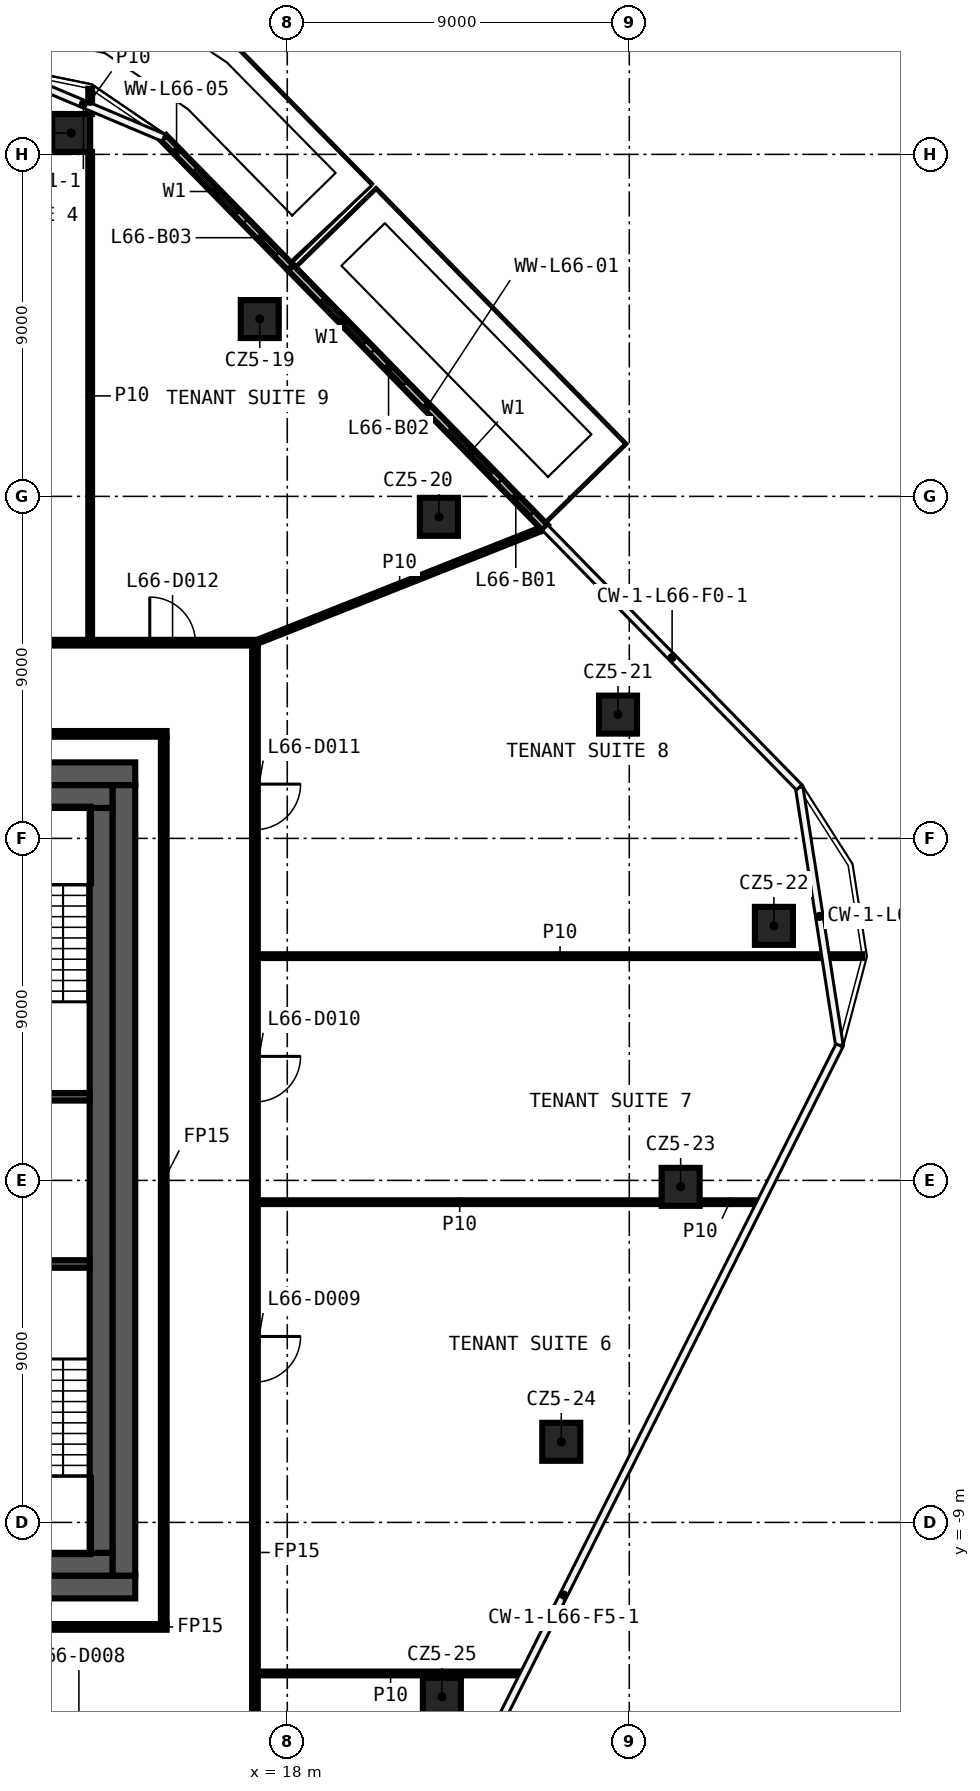
"""IFC4 building model, lengths in metres.
Left out: names, types, materials, properties, quantities, classifications, styles, units other than length and angle.
Written with IfcOpenShell. Run it as: python <this file> out.ifc"""

import sys

from ifc_helpers import new_model, si_unit, direction, frame, frame_2d, origin, origin_2d, place, context, subcontext, project, spatial, rectangle, extrude, element, fill, save


model = new_model("IFC4")
c1 = context("Model", 3, precision=1e-05, world=origin(), true_north=direction((0.0, 1.0)))
c2 = subcontext(c1, "Body", "Model", "MODEL_VIEW")
j1 = project(units=[si_unit("LENGTHUNIT", "METRE"), si_unit("PLANEANGLEUNIT", "RADIAN")], contexts=[c1])
p1 = place(None, origin())
s1 = spatial("IfcSite", under=j1, at=p1, CompositionType="ELEMENT")
p2 = place(p1, origin())
s2 = spatial("IfcBuilding", under=s1, at=p2, CompositionType="ELEMENT")
p3 = place(p2, frame((0.0, 0.0, 311.0)))
s3 = spatial("IfcBuildingStorey", under=s2, at=p3, CompositionType="ELEMENT", Elevation=311.0)
for number, where, z_axis, x_axis in (
    (1, (12.314, 27.563, 0.0), (0.0, 0.0, 1.0), (1.0, 0.0, 0.0)),
    (2, (17.276, 22.666, 0.0), (0.0, 0.0, 1.0), (1.0, 0.0, 0.0)),
    (3, (21.99, 17.462, 0.0), (0.0, 0.0, 1.0), (1.0, 0.0, 0.0)),
    (4, (26.703, 12.257, 0.0), (0.0, 0.0, 1.0), (1.0, 0.0, 0.0)),
    (5, (30.805, 6.698, 0.0), (0.0, 0.0, 1.0), (1.0, 0.0, 0.0)),
    (6, (28.351, -0.17, 0.0), (0.0, 0.0, 1.0), (1.0, 0.0, 0.0)),
    (7, (25.21, -6.879, 0.0), (0.0, 0.0, 1.0), (1.0, 0.0, 0.0)),
    (8, (22.068, -13.588, 0.0), (0.0, 0.0, 1.0), (1.0, 0.0, 0.0)),
):
    element("IfcColumn", number, at=place(p3, frame(where, z_axis=z_axis, x_axis=x_axis)), inside=s3, PredefinedType="COLUMN", context=c2, shape_type="SweptSolid", body=[
        extrude(rectangle(XDim=1.0, YDim=1.0, at=origin_2d()), origin(), (0.0, 0.0, 1.0), 3.82),
    ])
p4 = place(p3, frame((17.225, -12.975, 0.0), z_axis=(0.0, 0.0, 1.0), x_axis=(1.0, 0.0, 0.0)))
e9 = element("IfcWall", 9, at=p4, inside=s3, PredefinedType="PARTITIONING", context=c2, shape_type="SweptSolid", body=[
    extrude(rectangle(XDim=6.987, YDim=0.1, at=frame_2d((3.493, 0.0))), origin(), (0.0, 0.0, 1.0), 3.82),
])
p5 = place(p3, frame((9.0, -11.75, 0.0), z_axis=(0.0, 0.0, 1.0), x_axis=(1.0, 0.0, 0.0)))
e10 = element("IfcWall", 10, at=p5, inside=s3, PredefinedType="PARTITIONING", context=c2, shape_type="SweptSolid", body=[
    extrude(rectangle(XDim=5.825, YDim=0.15, at=frame_2d((2.913, 0.0))), origin(), (0.0, 0.0, 1.0), 3.82),
])
p6 = place(p3, frame((17.225, -0.573, 0.0), z_axis=(0.0, 0.0, 1.0), x_axis=(1.0, 0.0, 0.0)))
e11 = element("IfcWall", 11, at=p6, inside=s3, PredefinedType="PARTITIONING", context=c2, shape_type="SweptSolid", body=[
    extrude(rectangle(XDim=10.626, YDim=0.1, at=frame_2d((5.313, 0.0))), origin(), (0.0, 0.0, 1.0), 3.82),
])
p7 = place(p3, frame((28.851, -0.573, 0.0), z_axis=(0.0, 0.0, 1.0), x_axis=(1.0, 0.0, 0.0)))
e12 = element("IfcWall", 12, at=p7, inside=s3, PredefinedType="PARTITIONING", context=c2, shape_type="SweptSolid", body=[
    extrude(rectangle(XDim=1.586, YDim=0.1, at=frame_2d((0.793, 0.0))), origin(), (0.0, 0.0, 1.0), 3.82),
])
p8 = place(p3, frame((17.225, 5.901, 0.0), z_axis=(0.0, 0.0, 1.0), x_axis=(1.0, 0.0, 0.0)))
e13 = element("IfcWall", 13, at=p8, inside=s3, PredefinedType="PARTITIONING", context=c2, shape_type="SweptSolid", body=[
    extrude(rectangle(XDim=15.905, YDim=0.1, at=frame_2d((7.953, 0.0))), origin(), (0.0, 0.0, 1.0), 3.82),
])
p9 = place(p3, frame((3.6, 11.75, 0.0), z_axis=(0.0, 0.0, 1.0), x_axis=(1.0, 0.0, 0.0)))
e14 = element("IfcWall", 14, at=p9, inside=s3, PredefinedType="PARTITIONING", context=c2, shape_type="SweptSolid", body=[
    extrude(rectangle(XDim=11.225, YDim=0.15, at=frame_2d((5.612, 0.0))), origin(), (0.0, 0.0, 1.0), 3.82),
])
p10 = place(p3, frame((-17.225, 14.15, 0.0), z_axis=(0.0, 0.0, 1.0), x_axis=(1.0, 0.0, 0.0)))
e15 = element("IfcWall", 15, at=p10, inside=s3, PredefinedType="PARTITIONING", context=c2, shape_type="SweptSolid", body=[
    extrude(rectangle(XDim=34.45, YDim=0.15, at=frame_2d((17.225, 0.0))), origin(), (0.0, 0.0, 1.0), 3.82),
])
p11 = place(p10, frame((31.607, 0.0, 0.0)))
e16 = element("IfcOpeningElement", 16, at=p11, cuts=e15, PredefinedType="OPENING", context=c2, shape_type="SweptSolid", body=[
    extrude(rectangle(XDim=1.2, YDim=2.1, at=frame_2d((0.6, 1.05))), frame((0.0, 0.085, 0.0), z_axis=(0.0, -1.0, 0.0), x_axis=(1.0, 0.0, 0.0)), (0.0, 0.0, 1.0), 0.17),
])
p12 = place(p10, frame((25.936, 0.0, 0.0)))
e17 = element("IfcOpeningElement", 17, at=p12, cuts=e15, PredefinedType="OPENING", context=c2, shape_type="SweptSolid", body=[
    extrude(rectangle(XDim=1.2, YDim=2.1, at=frame_2d((0.6, 1.05))), frame((0.0, 0.085, 0.0), z_axis=(0.0, -1.0, 0.0), x_axis=(1.0, 0.0, 0.0)), (0.0, 0.0, 1.0), 0.17),
])
p13 = place(p10, frame((17.707, 0.0, 0.0)))
e18 = element("IfcOpeningElement", 18, at=p13, cuts=e15, PredefinedType="OPENING", context=c2, shape_type="SweptSolid", body=[
    extrude(rectangle(XDim=1.2, YDim=2.1, at=frame_2d((0.6, 1.05))), frame((0.0, 0.085, 0.0), z_axis=(0.0, -1.0, 0.0), x_axis=(1.0, 0.0, 0.0)), (0.0, 0.0, 1.0), 0.17),
])
p14 = place(p10, frame((10.617, 0.0, 0.0)))
e19 = element("IfcOpeningElement", 19, at=p14, cuts=e15, PredefinedType="OPENING", context=c2, shape_type="SweptSolid", body=[
    extrude(rectangle(XDim=1.2, YDim=2.1, at=frame_2d((0.6, 1.05))), frame((0.0, 0.085, 0.0), z_axis=(0.0, -1.0, 0.0), x_axis=(1.0, 0.0, 0.0)), (0.0, 0.0, 1.0), 0.17),
])
p15 = place(p10, frame((5.896, 0.0, 0.0)))
e20 = element("IfcOpeningElement", 20, at=p15, cuts=e15, PredefinedType="OPENING", context=c2, shape_type="SweptSolid", body=[
    extrude(rectangle(XDim=1.2, YDim=2.1, at=frame_2d((0.6, 1.05))), frame((0.0, 0.085, 0.0), z_axis=(0.0, -1.0, 0.0), x_axis=(1.0, 0.0, 0.0)), (0.0, 0.0, 1.0), 0.17),
])
p16 = place(p10, frame((1.506, 0.0, 0.0)))
e21 = element("IfcOpeningElement", 21, at=p16, cuts=e15, PredefinedType="OPENING", context=c2, shape_type="SweptSolid", body=[
    extrude(rectangle(XDim=1.2, YDim=2.1, at=frame_2d((0.6, 1.05))), frame((0.0, 0.085, 0.0), z_axis=(0.0, -1.0, 0.0), x_axis=(1.0, 0.0, 0.0)), (0.0, 0.0, 1.0), 0.17),
])
p17 = place(p3, frame((17.15, 14.15, 0.0), z_axis=(0.0, 0.0, 1.0), x_axis=(0.92958283513, 0.368613283308, 0.0)))
e22 = element("IfcWall", 22, at=p17, inside=s3, PredefinedType="PARTITIONING", context=c2, shape_type="SweptSolid", body=[
    extrude(rectangle(XDim=8.189, YDim=0.1, at=frame_2d((4.094, 0.0))), origin(), (0.0, 0.0, 1.0), 3.82),
])
p18 = place(p3, frame((17.15, 14.075, 0.0), z_axis=(0.0, 0.0, 1.0), x_axis=(0.0, -1.0, 0.0)))
e23 = element("IfcWall", 23, at=p18, inside=s3, PredefinedType="PARTITIONING", context=c2, shape_type="SweptSolid", body=[
    extrude(rectangle(XDim=28.15, YDim=0.15, at=frame_2d((14.075, 0.0))), origin(), (0.0, 0.0, 1.0), 3.82),
])
p19 = place(p18, frame((18.182, 0.0, 0.0)))
e24 = element("IfcOpeningElement", 24, at=p19, cuts=e23, PredefinedType="OPENING", context=c2, shape_type="SweptSolid", body=[
    extrude(rectangle(XDim=1.2, YDim=2.1, at=frame_2d((0.6, 1.05))), frame((0.0, 0.085, 0.0), z_axis=(0.0, -1.0, 0.0), x_axis=(1.0, 0.0, 0.0)), (0.0, 0.0, 1.0), 0.17),
])
p20 = place(p18, frame((10.811, 0.0, 0.0)))
e25 = element("IfcOpeningElement", 25, at=p20, cuts=e23, PredefinedType="OPENING", context=c2, shape_type="SweptSolid", body=[
    extrude(rectangle(XDim=1.2, YDim=2.1, at=frame_2d((0.6, 1.05))), frame((0.0, 0.085, 0.0), z_axis=(0.0, -1.0, 0.0), x_axis=(1.0, 0.0, 0.0)), (0.0, 0.0, 1.0), 0.17),
])
p21 = place(p18, frame((3.647, 0.0, 0.0)))
e26 = element("IfcOpeningElement", 26, at=p21, cuts=e23, PredefinedType="OPENING", context=c2, shape_type="SweptSolid", body=[
    extrude(rectangle(XDim=1.2, YDim=2.1, at=frame_2d((0.6, 1.05))), frame((0.0, 0.085, 0.0), z_axis=(0.0, -1.0, 0.0), x_axis=(1.0, 0.0, 0.0)), (0.0, 0.0, 1.0), 0.17),
])
p22 = place(p3, frame((14.75, -11.675, 0.0), z_axis=(0.0, 0.0, 1.0), x_axis=(0.0, 1.0, 0.0)))
e27 = element("IfcWall", 27, at=p22, inside=s3, PredefinedType="PARTITIONING", context=c2, shape_type="SweptSolid", body=[
    extrude(rectangle(XDim=23.35, YDim=0.15, at=frame_2d((11.675, 0.0))), origin(), (0.0, 0.0, 1.0), 3.82),
])
p23 = place(p3, frame((12.814, 14.225, 0.0), z_axis=(0.0, 0.0, 1.0), x_axis=(0.0, 1.0, 0.0)))
e28 = element("IfcWall", 28, at=p23, inside=s3, PredefinedType="PARTITIONING", context=c2, shape_type="SweptSolid", body=[
    extrude(rectangle(XDim=12.838, YDim=0.1, at=frame_2d((6.419, 0.0))), origin(), (0.0, 0.0, 1.0), 3.82),
])
p24 = place(p3, frame((12.814, 28.063, 0.0), z_axis=(0.0, 0.0, 1.0), x_axis=(0.0, 1.0, 0.0)))
e29 = element("IfcWall", 29, at=p24, inside=s3, PredefinedType="PARTITIONING", context=c2, shape_type="SweptSolid", body=[
    extrude(rectangle(XDim=0.664, YDim=0.1, at=frame_2d((0.332, 0.0))), origin(), (0.0, 0.0, 1.0), 3.82),
])
p25 = place(p3, frame((24.782, 17.177, 0.0), z_axis=(0.0, 0.0, 1.0), x_axis=(-0.699351369698, 0.714778050657, 0.0)))
e30 = element("IfcWall", 30, at=p25, inside=s3, PredefinedType="SOLIDWALL", context=c2, shape_type="SweptSolid", body=[
    extrude(rectangle(XDim=9.575, YDim=0.2, at=frame_2d((4.787, 0.0))), origin(), (0.0, 0.0, 1.0), 3.82),
])
p26 = place(p25, frame((2.0, 0.0, 0.6)))
e31 = element("IfcOpeningElement", 31, at=p26, cuts=e30, PredefinedType="OPENING", context=c2, shape_type="SweptSolid", body=[
    extrude(rectangle(XDim=1.6, YDim=2.4, at=frame_2d((0.8, 1.2))), frame((0.0, 0.11, 0.0), z_axis=(0.0, -1.0, 0.0), x_axis=(1.0, 0.0, 0.0)), (0.0, 0.0, 1.0), 0.22),
])
p27 = place(p25, frame((0.5, 0.0, 0.0)))
e32 = element("IfcOpeningElement", 32, at=p27, cuts=e30, PredefinedType="OPENING", context=c2, shape_type="SweptSolid", body=[
    extrude(rectangle(XDim=1.2, YDim=2.4, at=frame_2d((0.6, 1.2))), frame((0.0, 0.11, 0.0), z_axis=(0.0, -1.0, 0.0), x_axis=(1.0, 0.0, 0.0)), (0.0, 0.0, 1.0), 0.22),
])
p28 = place(p25, frame((6.787, 0.0, 0.6)))
e33 = element("IfcOpeningElement", 33, at=p28, cuts=e30, PredefinedType="OPENING", context=c2, shape_type="SweptSolid", body=[
    extrude(rectangle(XDim=1.6, YDim=2.4, at=frame_2d((0.8, 1.2))), frame((0.0, 0.11, 0.0), z_axis=(0.0, -1.0, 0.0), x_axis=(1.0, 0.0, 0.0)), (0.0, 0.0, 1.0), 0.22),
])
p29 = place(p25, frame((5.287, 0.0, 0.0)))
e34 = element("IfcOpeningElement", 34, at=p29, cuts=e30, PredefinedType="OPENING", context=c2, shape_type="SweptSolid", body=[
    extrude(rectangle(XDim=1.2, YDim=2.4, at=frame_2d((0.6, 1.2))), frame((0.0, 0.11, 0.0), z_axis=(0.0, -1.0, 0.0), x_axis=(1.0, 0.0, 0.0)), (0.0, 0.0, 1.0), 0.22),
])
p30 = place(p3, frame((18.086, 24.021, 0.0), z_axis=(0.0, 0.0, 1.0), x_axis=(-0.699373628804, 0.714756271279, 0.0)))
e35 = element("IfcWall", 35, at=p30, inside=s3, PredefinedType="SOLIDWALL", context=c2, shape_type="SweptSolid", body=[
    extrude(rectangle(XDim=4.777, YDim=0.2, at=frame_2d((2.389, 0.0))), origin(), (0.0, 0.0, 1.0), 3.82),
])
p31 = place(p30, frame((2.0, 0.0, 0.6)))
e36 = element("IfcOpeningElement", 36, at=p31, cuts=e35, PredefinedType="OPENING", context=c2, shape_type="SweptSolid", body=[
    extrude(rectangle(XDim=1.6, YDim=2.4, at=frame_2d((0.8, 1.2))), frame((0.0, 0.11, 0.0), z_axis=(0.0, -1.0, 0.0), x_axis=(1.0, 0.0, 0.0)), (0.0, 0.0, 1.0), 0.22),
])
p32 = place(p30, frame((0.5, 0.0, 0.0)))
e37 = element("IfcOpeningElement", 37, at=p32, cuts=e35, PredefinedType="OPENING", context=c2, shape_type="SweptSolid", body=[
    extrude(rectangle(XDim=1.2, YDim=2.4, at=frame_2d((0.6, 1.2))), frame((0.0, 0.11, 0.0), z_axis=(0.0, -1.0, 0.0), x_axis=(1.0, 0.0, 0.0)), (0.0, 0.0, 1.0), 0.22),
])
p33 = place(p3, frame((-14.0, 10.7, 0.0), z_axis=(0.0, 0.0, 1.0), x_axis=(1.0, 0.0, 0.0)))
e38 = element("IfcWall", 38, at=p33, inside=s3, PredefinedType="SHEAR", context=c2, shape_type="SweptSolid", body=[
    extrude(rectangle(XDim=28.0, YDim=0.6, at=frame_2d((14.0, 0.0))), origin(), (0.0, 0.0, 1.0), 3.82),
])
p34 = place(p33, frame((15.9, 0.0, 0.0)))
e39 = element("IfcOpeningElement", 39, at=p34, cuts=e38, PredefinedType="OPENING", context=c2, shape_type="SweptSolid", body=[
    extrude(rectangle(XDim=1.6, YDim=2.1, at=frame_2d((0.8, 1.05))), frame((0.0, 0.31, 0.0), z_axis=(0.0, -1.0, 0.0), x_axis=(1.0, 0.0, 0.0)), (0.0, 0.0, 1.0), 0.62),
])
p35 = place(p3, frame((14.0, -10.7, 0.0), z_axis=(0.0, 0.0, 1.0), x_axis=(-1.0, 0.0, 0.0)))
e40 = element("IfcWall", 40, at=p35, inside=s3, PredefinedType="SHEAR", context=c2, shape_type="SweptSolid", body=[
    extrude(rectangle(XDim=28.0, YDim=0.6, at=frame_2d((14.0, 0.0))), origin(), (0.0, 0.0, 1.0), 3.82),
])
p36 = place(p35, frame((5.1, 0.0, 0.0)))
e41 = element("IfcOpeningElement", 41, at=p36, cuts=e40, PredefinedType="OPENING", context=c2, shape_type="SweptSolid", body=[
    extrude(rectangle(XDim=1.6, YDim=2.1, at=frame_2d((0.8, 1.05))), frame((0.0, 0.31, 0.0), z_axis=(0.0, -1.0, 0.0), x_axis=(1.0, 0.0, 0.0)), (0.0, 0.0, 1.0), 0.62),
])
p37 = place(p3, frame((13.7, 10.4, 0.0), z_axis=(0.0, 0.0, 1.0), x_axis=(0.0, -1.0, 0.0)))
e42 = element("IfcWall", 42, at=p37, inside=s3, PredefinedType="SHEAR", context=c2, shape_type="SweptSolid", body=[
    extrude(rectangle(XDim=20.8, YDim=0.6, at=frame_2d((10.4, 0.0))), origin(), (0.0, 0.0, 1.0), 3.82),
])
p38 = place(p3, frame((3.9, 10.1, 0.0), z_axis=(0.0, 0.0, 1.0), x_axis=(1.0, 0.0, 0.0)))
e43 = element("IfcWall", 43, at=p38, inside=s3, PredefinedType="SHEAR", context=c2, shape_type="SweptSolid", body=[
    extrude(rectangle(XDim=9.5, YDim=0.6, at=frame_2d((4.75, 0.0))), origin(), (0.0, 0.0, 1.0), 3.82),
])
p39 = place(p3, frame((13.4, -10.1, 0.0), z_axis=(0.0, 0.0, 1.0), x_axis=(-1.0, 0.0, 0.0)))
e44 = element("IfcWall", 44, at=p39, inside=s3, PredefinedType="SHEAR", context=c2, shape_type="SweptSolid", body=[
    extrude(rectangle(XDim=4.1, YDim=0.6, at=frame_2d((2.05, 0.0))), origin(), (0.0, 0.0, 1.0), 3.82),
])
p40 = place(p3, frame((13.1, 9.8, 0.0), z_axis=(0.0, 0.0, 1.0), x_axis=(0.0, -1.0, 0.0)))
e45 = element("IfcWall", 45, at=p40, inside=s3, PredefinedType="SHEAR", context=c2, shape_type="SweptSolid", body=[
    extrude(rectangle(XDim=19.6, YDim=0.6, at=frame_2d((9.8, 0.0))), origin(), (0.0, 0.0, 1.0), 3.82),
])
for number, where, z_axis, x_axis in (
    (46, (9.45, 2.2, 0.0), (0.0, 0.0, 1.0), (1.0, 0.0, 0.0)),
    (47, (9.45, -2.2, 0.0), (0.0, 0.0, 1.0), (1.0, 0.0, 0.0)),
):
    element("IfcWall", number, at=place(p3, frame(where, z_axis=z_axis, x_axis=x_axis)), inside=s3, PredefinedType="SHEAR", context=c2, shape_type="SweptSolid", body=[
        extrude(rectangle(XDim=3.35, YDim=0.2, at=frame_2d((1.675, 0.0))), origin(), (0.0, 0.0, 1.0), 3.82),
    ])
p41 = place(p19, origin())
e48 = element("IfcDoor", 48, at=p41, inside=s3, OperationType="SINGLE_SWING_RIGHT", PredefinedType="DOOR", context=c2, shape_type="SweptSolid", body=[
    extrude(rectangle(XDim=1.2, YDim=2.1, at=frame_2d((0.6, 1.05))), frame((0.0, 0.025, 0.0), z_axis=(0.0, -1.0, 0.0), x_axis=(1.0, 0.0, 0.0)), (0.0, 0.0, 1.0), 0.05),
])
fill(e24, e48)
p42 = place(p20, origin())
e49 = element("IfcDoor", 49, at=p42, inside=s3, OperationType="SINGLE_SWING_LEFT", PredefinedType="DOOR", context=c2, shape_type="SweptSolid", body=[
    extrude(rectangle(XDim=1.2, YDim=2.1, at=frame_2d((0.6, 1.05))), frame((0.0, 0.025, 0.0), z_axis=(0.0, -1.0, 0.0), x_axis=(1.0, 0.0, 0.0)), (0.0, 0.0, 1.0), 0.05),
])
fill(e25, e49)
p43 = place(p21, origin())
e50 = element("IfcDoor", 50, at=p43, inside=s3, OperationType="SINGLE_SWING_RIGHT", PredefinedType="DOOR", context=c2, shape_type="SweptSolid", body=[
    extrude(rectangle(XDim=1.2, YDim=2.1, at=frame_2d((0.6, 1.05))), frame((0.0, 0.025, 0.0), z_axis=(0.0, -1.0, 0.0), x_axis=(1.0, 0.0, 0.0)), (0.0, 0.0, 1.0), 0.05),
])
fill(e26, e50)
p44 = place(p11, origin())
e51 = element("IfcDoor", 51, at=p44, inside=s3, OperationType="SINGLE_SWING_LEFT", PredefinedType="DOOR", context=c2, shape_type="SweptSolid", body=[
    extrude(rectangle(XDim=1.2, YDim=2.1, at=frame_2d((0.6, 1.05))), frame((0.0, 0.025, 0.0), z_axis=(0.0, -1.0, 0.0), x_axis=(1.0, 0.0, 0.0)), (0.0, 0.0, 1.0), 0.05),
])
fill(e16, e51)
p45 = place(p26, origin())
e52 = element("IfcWindow", 52, at=p45, inside=s3, PartitioningType="SINGLE_PANEL", PredefinedType="WINDOW", context=c2, shape_type="SweptSolid", body=[
    extrude(rectangle(XDim=1.6, YDim=2.4, at=frame_2d((0.8, 1.2))), frame((0.0, 0.03, 0.0), z_axis=(0.0, -1.0, 0.0), x_axis=(1.0, 0.0, 0.0)), (0.0, 0.0, 1.0), 0.06),
])
fill(e31, e52)
p46 = place(p27, origin())
e53 = element("IfcDoor", 53, at=p46, inside=s3, OperationType="SLIDING_TO_LEFT", PredefinedType="DOOR", context=c2, shape_type="SweptSolid", body=[
    extrude(rectangle(XDim=1.2, YDim=2.4, at=frame_2d((0.6, 1.2))), frame((0.0, 0.025, 0.0), z_axis=(0.0, -1.0, 0.0), x_axis=(1.0, 0.0, 0.0)), (0.0, 0.0, 1.0), 0.05),
])
fill(e32, e53)
p47 = place(p28, origin())
e54 = element("IfcWindow", 54, at=p47, inside=s3, PartitioningType="SINGLE_PANEL", PredefinedType="WINDOW", context=c2, shape_type="SweptSolid", body=[
    extrude(rectangle(XDim=1.6, YDim=2.4, at=frame_2d((0.8, 1.2))), frame((0.0, 0.03, 0.0), z_axis=(0.0, -1.0, 0.0), x_axis=(1.0, 0.0, 0.0)), (0.0, 0.0, 1.0), 0.06),
])
fill(e33, e54)
p48 = place(p29, origin())
e55 = element("IfcDoor", 55, at=p48, inside=s3, OperationType="SLIDING_TO_LEFT", PredefinedType="DOOR", context=c2, shape_type="SweptSolid", body=[
    extrude(rectangle(XDim=1.2, YDim=2.4, at=frame_2d((0.6, 1.2))), frame((0.0, 0.025, 0.0), z_axis=(0.0, -1.0, 0.0), x_axis=(1.0, 0.0, 0.0)), (0.0, 0.0, 1.0), 0.05),
])
fill(e34, e55)
p49 = place(p31, origin())
e56 = element("IfcWindow", 56, at=p49, inside=s3, PartitioningType="SINGLE_PANEL", PredefinedType="WINDOW", context=c2, shape_type="SweptSolid", body=[
    extrude(rectangle(XDim=1.6, YDim=2.4, at=frame_2d((0.8, 1.2))), frame((0.0, 0.03, 0.0), z_axis=(0.0, -1.0, 0.0), x_axis=(1.0, 0.0, 0.0)), (0.0, 0.0, 1.0), 0.06),
])
fill(e36, e56)
p50 = place(p32, origin())
e57 = element("IfcDoor", 57, at=p50, inside=s3, OperationType="SLIDING_TO_LEFT", PredefinedType="DOOR", context=c2, shape_type="SweptSolid", body=[
    extrude(rectangle(XDim=1.2, YDim=2.4, at=frame_2d((0.6, 1.2))), frame((0.0, 0.025, 0.0), z_axis=(0.0, -1.0, 0.0), x_axis=(1.0, 0.0, 0.0)), (0.0, 0.0, 1.0), 0.05),
])
fill(e37, e57)
save(model, sys.argv[1])
